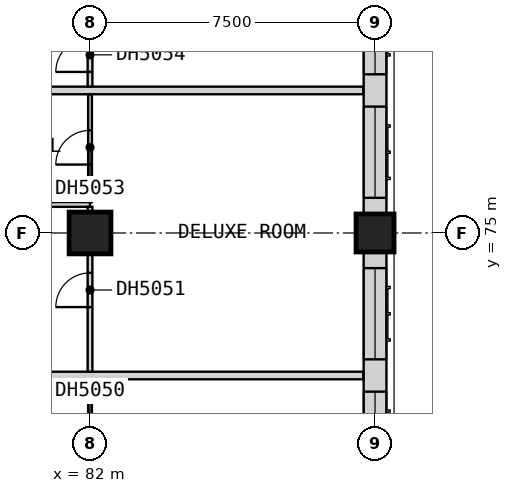
"""IFC4 building model, lengths in metres.
Left out: names, types, materials, properties, quantities, classifications, styles, units other than length and angle.
Written with IfcOpenShell. Run it as: python <this file> out.ifc"""

import sys

from ifc_helpers import new_model, si_unit, direction, frame, frame_2d, origin, origin_2d, place, context, subcontext, project, spatial, rectangle, extrude, element, fill, save


model = new_model("IFC4")
c1 = context("Model", 3, precision=1e-05, world=origin(), true_north=direction((0.0, 1.0)))
c2 = subcontext(c1, "Body", "Model", "MODEL_VIEW")
j1 = project(units=[si_unit("LENGTHUNIT", "METRE"), si_unit("PLANEANGLEUNIT", "RADIAN")], contexts=[c1])
p1 = place(None, origin())
s1 = spatial("IfcSite", under=j1, at=p1, CompositionType="ELEMENT")
p2 = place(p1, origin())
s2 = spatial("IfcBuilding", under=s1, at=p2, CompositionType="ELEMENT")
p3 = place(p2, frame((0.0, 0.0, 93.5)))
s3 = spatial("IfcBuildingStorey", under=s2, at=p3, CompositionType="ELEMENT", Elevation=93.5)
p4 = place(p3, frame((82.0, 75.0, 0.0), z_axis=(0.0, 0.0, 1.0), x_axis=(1.0, 0.0, 0.0)))
e1 = element("IfcColumn", 1, at=p4, inside=s3, PredefinedType="COLUMN", context=c2, shape_type="SweptSolid", body=[
    extrude(rectangle(XDim=1.1, YDim=1.1, at=origin_2d()), origin(), (0.0, 0.0, 1.0), 3.6),
])
p5 = place(p3, frame((89.5, 75.0, 0.0), z_axis=(0.0, 0.0, 1.0), x_axis=(1.0, 0.0, 0.0)))
e2 = element("IfcColumn", 2, at=p5, inside=s3, PredefinedType="COLUMN", context=c2, shape_type="SweptSolid", body=[
    extrude(rectangle(XDim=1.0, YDim=1.0, at=origin_2d()), origin(), (0.0, 0.0, 1.0), 3.6),
])
p6 = place(p3, frame((89.5, 68.0, 0.0), z_axis=(0.0, 0.0, 1.0), x_axis=(0.0, 1.0, 0.0)))
e3 = element("IfcWall", 3, at=p6, inside=s3, PredefinedType="SOLIDWALL", context=c2, shape_type="SweptSolid", body=[
    extrude(rectangle(XDim=6.5, YDim=0.6, at=frame_2d((3.25, 0.0))), origin(), (0.0, 0.0, 1.0), 2.85),
])
p7 = place(p6, frame((0.425, 0.0, 0.8)))
e4 = element("IfcOpeningElement", 4, at=p7, cuts=e3, PredefinedType="OPENING", context=c2, shape_type="SweptSolid", body=[
    extrude(rectangle(XDim=2.4, YDim=1.8, at=frame_2d((1.2, 0.9))), frame((0.0, 0.31, 0.0), z_axis=(0.0, -1.0, 0.0), x_axis=(1.0, 0.0, 0.0)), (0.0, 0.0, 1.0), 0.62),
])
p8 = place(p6, frame((3.675, 0.0, 0.8)))
e5 = element("IfcOpeningElement", 5, at=p8, cuts=e3, PredefinedType="OPENING", context=c2, shape_type="SweptSolid", body=[
    extrude(rectangle(XDim=2.4, YDim=1.8, at=frame_2d((1.2, 0.9))), frame((0.0, 0.31, 0.0), z_axis=(0.0, -1.0, 0.0), x_axis=(1.0, 0.0, 0.0)), (0.0, 0.0, 1.0), 0.62),
])
p9 = place(p3, frame((89.5, 75.5, 0.0), z_axis=(0.0, 0.0, 1.0), x_axis=(0.0, 1.0, 0.0)))
e6 = element("IfcWall", 6, at=p9, inside=s3, PredefinedType="SOLIDWALL", context=c2, shape_type="SweptSolid", body=[
    extrude(rectangle(XDim=6.5, YDim=0.6, at=frame_2d((3.25, 0.0))), origin(), (0.0, 0.0, 1.0), 2.85),
])
p10 = place(p9, frame((0.425, 0.0, 0.8)))
e7 = element("IfcOpeningElement", 7, at=p10, cuts=e6, PredefinedType="OPENING", context=c2, shape_type="SweptSolid", body=[
    extrude(rectangle(XDim=2.4, YDim=1.8, at=frame_2d((1.2, 0.9))), frame((0.0, 0.31, 0.0), z_axis=(0.0, -1.0, 0.0), x_axis=(1.0, 0.0, 0.0)), (0.0, 0.0, 1.0), 0.62),
])
p11 = place(p9, frame((3.675, 0.0, 0.8)))
e8 = element("IfcOpeningElement", 8, at=p11, cuts=e6, PredefinedType="OPENING", context=c2, shape_type="SweptSolid", body=[
    extrude(rectangle(XDim=2.4, YDim=1.8, at=frame_2d((1.2, 0.9))), frame((0.0, 0.31, 0.0), z_axis=(0.0, -1.0, 0.0), x_axis=(1.0, 0.0, 0.0)), (0.0, 0.0, 1.0), 0.62),
])
for number, where, z_axis, x_axis in (
    (9, (77.475, 71.25, 0.0), (0.0, 0.0, 1.0), (1.0, 0.0, 0.0)),
    (10, (77.475, 78.75, 0.0), (0.0, 0.0, 1.0), (1.0, 0.0, 0.0)),
):
    element("IfcWall", number, at=place(p3, frame(where, z_axis=z_axis, x_axis=x_axis)), inside=s3, PredefinedType="PARTITIONING", context=c2, shape_type="SweptSolid", body=[
        extrude(rectangle(XDim=11.715, YDim=0.2, at=frame_2d((5.857, 0.0))), origin(), (0.0, 0.0, 1.0), 3.35),
    ])
p12 = place(p3, frame((82.0, 68.312, 0.0), z_axis=(0.0, 0.0, 1.0), x_axis=(0.0, 1.0, 0.0)))
e11 = element("IfcWall", 11, at=p12, inside=s3, PredefinedType="PARTITIONING", context=c2, shape_type="SweptSolid", body=[
    extrude(rectangle(XDim=2.837, YDim=0.1, at=frame_2d((1.419, 0.0))), origin(), (0.0, 0.0, 1.0), 3.35),
])
p13 = place(p12, frame((0.988, 0.0, 0.0)))
e12 = element("IfcOpeningElement", 12, at=p13, cuts=e11, PredefinedType="OPENING", context=c2, shape_type="SweptSolid", body=[
    extrude(rectangle(XDim=0.9, YDim=2.1, at=frame_2d((0.45, 1.05))), frame((0.0, 0.06, 0.0), z_axis=(0.0, -1.0, 0.0), x_axis=(1.0, 0.0, 0.0)), (0.0, 0.0, 1.0), 0.12),
])
p14 = place(p3, frame((82.0, 75.812, 0.0), z_axis=(0.0, 0.0, 1.0), x_axis=(0.0, 1.0, 0.0)))
e13 = element("IfcWall", 13, at=p14, inside=s3, PredefinedType="PARTITIONING", context=c2, shape_type="SweptSolid", body=[
    extrude(rectangle(XDim=2.837, YDim=0.1, at=frame_2d((1.419, 0.0))), origin(), (0.0, 0.0, 1.0), 3.35),
])
p15 = place(p14, frame((0.988, 0.0, 0.0)))
e14 = element("IfcOpeningElement", 14, at=p15, cuts=e13, PredefinedType="OPENING", context=c2, shape_type="SweptSolid", body=[
    extrude(rectangle(XDim=0.9, YDim=2.1, at=frame_2d((0.45, 1.05))), frame((0.0, 0.06, 0.0), z_axis=(0.0, -1.0, 0.0), x_axis=(1.0, 0.0, 0.0)), (0.0, 0.0, 1.0), 0.12),
])
p16 = place(p3, frame((77.475, 75.75, 0.0), z_axis=(0.0, 0.0, 1.0), x_axis=(1.0, 0.0, 0.0)))
e15 = element("IfcWall", 15, at=p16, inside=s3, PredefinedType="PARTITIONING", context=c2, shape_type="SweptSolid", body=[
    extrude(rectangle(XDim=4.525, YDim=0.125, at=frame_2d((2.262, 0.0))), origin(), (0.0, 0.0, 1.0), 3.35),
])
p17 = place(p3, frame((82.0, 71.35, 0.0), z_axis=(0.0, 0.0, 1.0), x_axis=(0.0, 1.0, 0.0)))
e16 = element("IfcWall", 16, at=p17, inside=s3, PredefinedType="PARTITIONING", context=c2, shape_type="SweptSolid", body=[
    extrude(rectangle(XDim=4.337, YDim=0.125, at=frame_2d((2.169, 0.0))), origin(), (0.0, 0.0, 1.0), 3.35),
])
p18 = place(p17, frame((1.7, 0.0, 0.0)))
e17 = element("IfcOpeningElement", 17, at=p18, cuts=e16, PredefinedType="OPENING", context=c2, shape_type="SweptSolid", body=[
    extrude(rectangle(XDim=0.9, YDim=2.1, at=frame_2d((0.45, 1.05))), frame((0.0, 0.073, 0.0), z_axis=(0.0, -1.0, 0.0), x_axis=(1.0, 0.0, 0.0)), (0.0, 0.0, 1.0), 0.145),
])
p19 = place(p3, frame((82.0, 78.85, 0.0), z_axis=(0.0, 0.0, 1.0), x_axis=(0.0, 1.0, 0.0)))
e18 = element("IfcWall", 18, at=p19, inside=s3, PredefinedType="PARTITIONING", context=c2, shape_type="SweptSolid", body=[
    extrude(rectangle(XDim=1.712, YDim=0.125, at=frame_2d((0.856, 0.0))), origin(), (0.0, 0.0, 1.0), 3.35),
])
p20 = place(p19, frame((0.387, 0.0, 0.0)))
e19 = element("IfcOpeningElement", 19, at=p20, cuts=e18, PredefinedType="OPENING", context=c2, shape_type="SweptSolid", body=[
    extrude(rectangle(XDim=0.9, YDim=2.1, at=frame_2d((0.45, 1.05))), frame((0.0, 0.073, 0.0), z_axis=(0.0, -1.0, 0.0), x_axis=(1.0, 0.0, 0.0)), (0.0, 0.0, 1.0), 0.145),
])
p21 = place(p7, origin())
e20 = element("IfcWindow", 20, at=p21, inside=s3, PartitioningType="SINGLE_PANEL", PredefinedType="WINDOW", context=c2, shape_type="SweptSolid", body=[
    extrude(rectangle(XDim=2.4, YDim=1.8, at=frame_2d((1.2, 0.9))), frame((0.0, -0.07, 0.0), z_axis=(0.0, -1.0, 0.0), x_axis=(1.0, 0.0, 0.0)), (0.0, 0.0, 1.0), 0.06),
])
fill(e4, e20)
p22 = place(p8, origin())
e21 = element("IfcWindow", 21, at=p22, inside=s3, PartitioningType="SINGLE_PANEL", PredefinedType="WINDOW", context=c2, shape_type="SweptSolid", body=[
    extrude(rectangle(XDim=2.4, YDim=1.8, at=frame_2d((1.2, 0.9))), frame((0.0, -0.07, 0.0), z_axis=(0.0, -1.0, 0.0), x_axis=(1.0, 0.0, 0.0)), (0.0, 0.0, 1.0), 0.06),
])
fill(e5, e21)
p23 = place(p10, origin())
e22 = element("IfcWindow", 22, at=p23, inside=s3, PartitioningType="SINGLE_PANEL", PredefinedType="WINDOW", context=c2, shape_type="SweptSolid", body=[
    extrude(rectangle(XDim=2.4, YDim=1.8, at=frame_2d((1.2, 0.9))), frame((0.0, -0.07, 0.0), z_axis=(0.0, -1.0, 0.0), x_axis=(1.0, 0.0, 0.0)), (0.0, 0.0, 1.0), 0.06),
])
fill(e7, e22)
p24 = place(p11, origin())
e23 = element("IfcWindow", 23, at=p24, inside=s3, PartitioningType="SINGLE_PANEL", PredefinedType="WINDOW", context=c2, shape_type="SweptSolid", body=[
    extrude(rectangle(XDim=2.4, YDim=1.8, at=frame_2d((1.2, 0.9))), frame((0.0, -0.07, 0.0), z_axis=(0.0, -1.0, 0.0), x_axis=(1.0, 0.0, 0.0)), (0.0, 0.0, 1.0), 0.06),
])
fill(e8, e23)
p25 = place(p18, origin())
e24 = element("IfcDoor", 24, at=p25, inside=s3, OperationType="SINGLE_SWING_LEFT", PredefinedType="DOOR", context=c2, shape_type="SweptSolid", body=[
    extrude(rectangle(XDim=0.9, YDim=2.1, at=frame_2d((0.45, 1.05))), frame((0.0, 0.025, 0.0), z_axis=(0.0, -1.0, 0.0), x_axis=(1.0, 0.0, 0.0)), (0.0, 0.0, 1.0), 0.05),
])
fill(e17, e24)
p26 = place(p15, origin())
e25 = element("IfcDoor", 25, at=p26, inside=s3, OperationType="SINGLE_SWING_LEFT", PredefinedType="DOOR", context=c2, shape_type="SweptSolid", body=[
    extrude(rectangle(XDim=0.9, YDim=2.1, at=frame_2d((0.45, 1.05))), frame((0.0, 0.025, 0.0), z_axis=(0.0, -1.0, 0.0), x_axis=(1.0, 0.0, 0.0)), (0.0, 0.0, 1.0), 0.05),
])
fill(e14, e25)
p27 = place(p20, origin())
e26 = element("IfcDoor", 26, at=p27, inside=s3, OperationType="SINGLE_SWING_LEFT", PredefinedType="DOOR", context=c2, shape_type="SweptSolid", body=[
    extrude(rectangle(XDim=0.9, YDim=2.1, at=frame_2d((0.45, 1.05))), frame((0.0, 0.025, 0.0), z_axis=(0.0, -1.0, 0.0), x_axis=(1.0, 0.0, 0.0)), (0.0, 0.0, 1.0), 0.05),
])
fill(e19, e26)
save(model, sys.argv[1])
